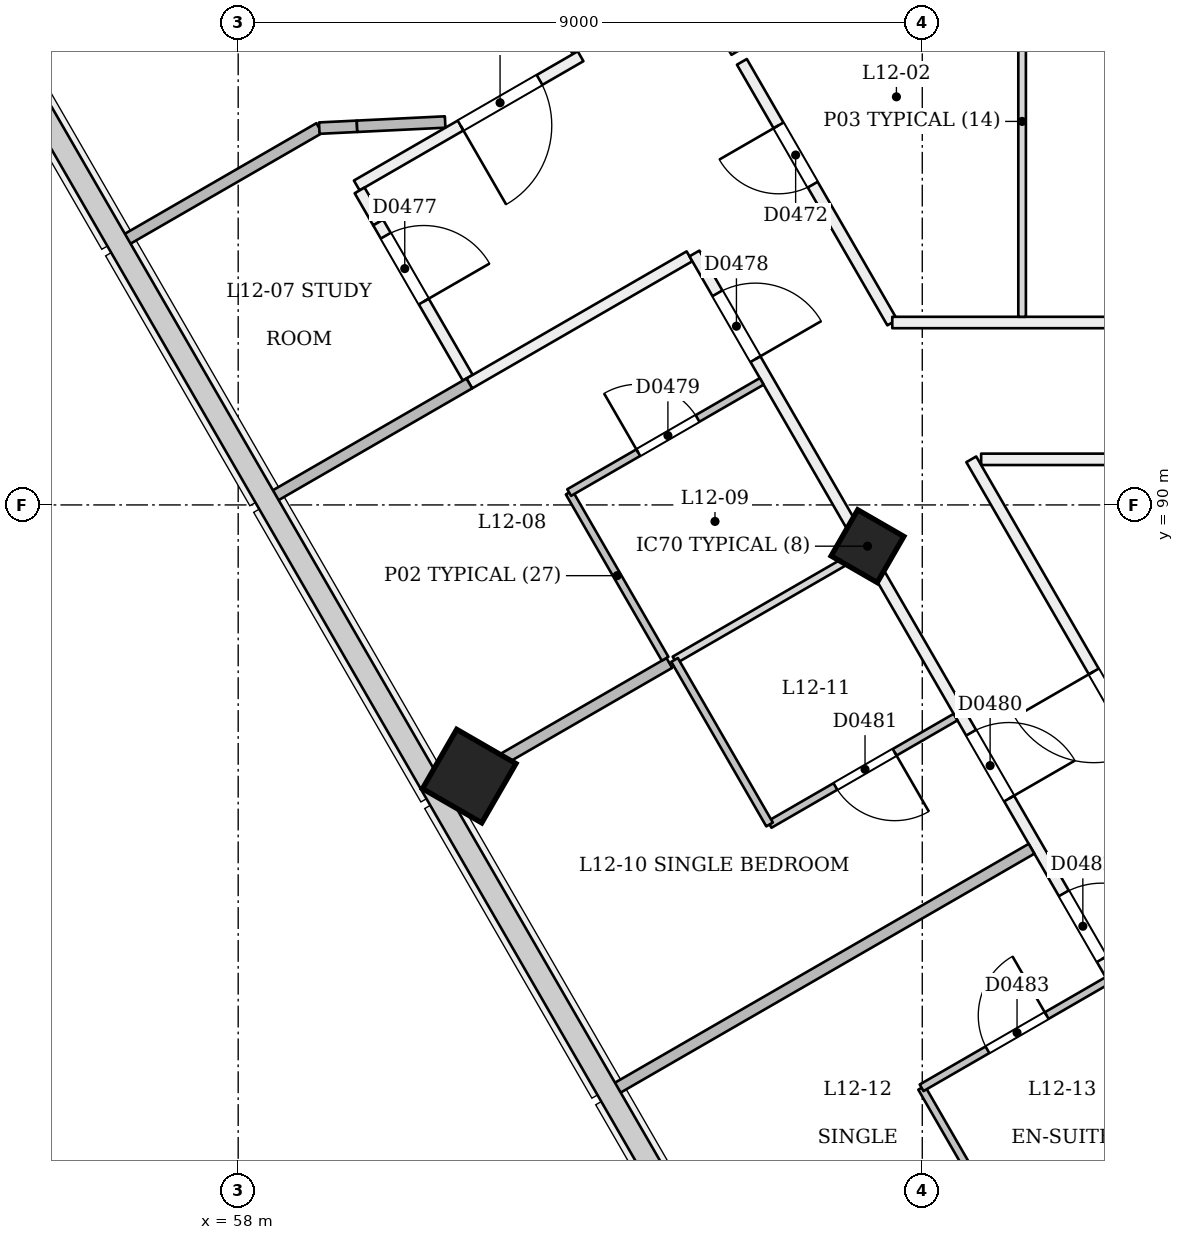
"""IFC4 building model, lengths in metres.
Left out: names, types, materials, properties, quantities, classifications, styles, units other than length and angle.
Written with IfcOpenShell. Run it as: python <this file> out.ifc"""

import sys

from ifc_helpers import new_model, si_unit, direction, frame, frame_2d, origin, origin_2d, place, context, subcontext, project, spatial, rectangle, extrude, element, fill, save


model = new_model("IFC4")
c1 = context("Model", 3, precision=1e-05, world=origin(), true_north=direction((0.0, 1.0)))
c2 = subcontext(c1, "Body", "Model", "MODEL_VIEW")
j1 = project(units=[si_unit("LENGTHUNIT", "METRE"), si_unit("PLANEANGLEUNIT", "RADIAN")], contexts=[c1])
p1 = place(None, origin())
s1 = spatial("IfcSite", under=j1, at=p1, CompositionType="ELEMENT")
p2 = place(p1, origin())
s2 = spatial("IfcBuilding", under=s1, at=p2, CompositionType="ELEMENT")
p3 = place(p2, frame((0.0, 0.0, 52.2)))
s3 = spatial("IfcBuildingStorey", under=s2, at=p3, CompositionType="ELEMENT", Elevation=52.2)
p4 = place(p3, frame((66.252, 89.41, -0.021), z_axis=(0.02215369191, 0.038413282303, 0.999016333038), x_axis=(-0.865357758702, -0.499681054678, 0.038403034389)))
e1 = element("IfcColumn", 1, at=p4, inside=s3, PredefinedType="COLUMN", context=c2, shape_type="SweptSolid", body=[
    extrude(rectangle(XDim=0.7, YDim=0.7, at=origin_2d()), origin(), (0.0, 0.0, 1.0), 3.604),
])
p5 = place(p3, frame((61.012, 86.385, -0.027), z_axis=(0.02222134892, 0.038480872521, 0.999012229206), x_axis=(-0.865637891076, -0.499189450988, 0.038482899528)))
e2 = element("IfcColumn", 2, at=p5, inside=s3, PredefinedType="COLUMN", context=c2, shape_type="SweptSolid", body=[
    extrude(rectangle(XDim=0.9, YDim=0.9, at=origin_2d()), origin(), (0.0, 0.0, 1.0), 3.604),
])
p6 = place(p3, frame((64.554, 95.959, 0.0), z_axis=(0.0, 0.0, 1.0), x_axis=(-0.502910495829, 0.864338494564, 0.0)))
e3 = element("IfcWall", 3, at=p6, inside=s3, PredefinedType="PARTITIONING", context=c2, shape_type="SweptSolid", body=[
    extrude(rectangle(XDim=0.98, YDim=0.15, at=frame_2d((0.49, 0.0))), origin(), (0.0, 0.0, 1.0), 3.1),
])
p7 = place(p3, frame((66.605, 92.4, 0.0), z_axis=(0.0, 0.0, 1.0), x_axis=(-0.499793629879, 0.866144518849, 0.0)))
e4 = element("IfcWall", 4, at=p7, inside=s3, PredefinedType="PARTITIONING", context=c2, shape_type="SweptSolid", body=[
    extrude(rectangle(XDim=3.959, YDim=0.15, at=frame_2d((1.979, 0.0))), origin(), (0.0, 0.0, 1.0), 3.1),
])
p8 = place(p7, frame((2.094, 0.0, 0.0)))
e5 = element("IfcOpeningElement", 5, at=p8, cuts=e4, PredefinedType="OPENING", context=c2, shape_type="SweptSolid", body=[
    extrude(rectangle(XDim=0.9, YDim=2.1, at=frame_2d((0.45, 1.05))), frame((0.0, 0.085, 0.0), z_axis=(0.0, -1.0, 0.0), x_axis=(1.0, 0.0, 0.0)), (0.0, 0.0, 1.0), 0.171),
])
p9 = place(p3, frame((70.125, 92.4, 0.0), z_axis=(0.0, 0.0, 1.0), x_axis=(-1.0, 0.0, 0.0)))
e6 = element("IfcWall", 6, at=p9, inside=s3, PredefinedType="PARTITIONING", context=c2, shape_type="SweptSolid", body=[
    extrude(rectangle(XDim=3.52, YDim=0.15, at=frame_2d((1.76, 0.0))), origin(), (0.0, 0.0, 1.0), 3.1),
])
p10 = place(p3, frame((61.983, 96.806, 0.0), z_axis=(0.0, 0.0, 1.0), x_axis=(0.499962526042, -0.866047038303, 0.0)))
e7 = element("IfcWall", 7, at=p10, inside=s3, PredefinedType="PARTITIONING", context=c2, shape_type="SweptSolid", body=[
    extrude(rectangle(XDim=0.968, YDim=0.15, at=frame_2d((0.484, 0.0))), origin(), (0.0, 0.0, 1.0), 3.1),
])
p11 = place(p3, frame((62.505, 95.903, 0.0), z_axis=(0.0, 0.0, 1.0), x_axis=(-0.866038511948, -0.499977295307, 0.0)))
e8 = element("IfcWall", 8, at=p11, inside=s3, PredefinedType="PARTITIONING", context=c2, shape_type="SweptSolid", body=[
    extrude(rectangle(XDim=3.4, YDim=0.15, at=frame_2d((1.7, 0.0))), origin(), (0.0, 0.0, 1.0), 2.6),
])
p12 = place(p11, frame((0.623, 0.0, 0.0)))
e9 = element("IfcOpeningElement", 9, at=p12, cuts=e8, PredefinedType="OPENING", context=c2, shape_type="SweptSolid", body=[
    extrude(rectangle(XDim=1.2, YDim=2.1, at=frame_2d((0.6, 1.05))), frame((0.0, 0.085, 0.0), z_axis=(0.0, -1.0, 0.0), x_axis=(1.0, 0.0, 0.0)), (0.0, 0.0, 1.0), 0.171),
])
p13 = place(p3, frame((59.598, 94.138, 0.0), z_axis=(0.0, 0.0, 1.0), x_axis=(0.499852395195, -0.866110606688, 0.0)))
e10 = element("IfcWall", 10, at=p13, inside=s3, PredefinedType="PARTITIONING", context=c2, shape_type="SweptSolid", body=[
    extrude(rectangle(XDim=0.488, YDim=0.15, at=frame_2d((0.244, 0.0))), origin(), (0.0, 0.0, 1.0), 2.6),
])
p14 = place(p3, frame((59.842, 93.715, 0.0), z_axis=(0.0, 0.0, 1.0), x_axis=(0.500003288626, -0.866023505087, 0.0)))
e11 = element("IfcWall", 11, at=p14, inside=s3, PredefinedType="PARTITIONING", context=c2, shape_type="SweptSolid", body=[
    extrude(rectangle(XDim=2.358, YDim=0.15, at=frame_2d((1.179, 0.0))), origin(), (0.0, 0.0, 1.0), 3.1),
])
p15 = place(p14, frame((0.2, 0.0, 0.0)))
e12 = element("IfcOpeningElement", 12, at=p15, cuts=e11, PredefinedType="OPENING", context=c2, shape_type="SweptSolid", body=[
    extrude(rectangle(XDim=1.0, YDim=2.1, at=frame_2d((0.5, 1.05))), frame((0.0, 0.085, 0.0), z_axis=(0.0, -1.0, 0.0), x_axis=(1.0, 0.0, 0.0)), (0.0, 0.0, 1.0), 0.171),
])
p16 = place(p3, frame((61.041, 91.598, 0.0), z_axis=(0.0, 0.0, 1.0), x_axis=(0.866033651025, 0.499985715088, 0.0)))
e13 = element("IfcWall", 13, at=p16, inside=s3, PredefinedType="PARTITIONING", context=c2, shape_type="SweptSolid", body=[
    extrude(rectangle(XDim=3.345, YDim=0.15, at=frame_2d((1.672, 0.0))), origin(), (0.0, 0.0, 1.0), 3.1),
])
p17 = place(p3, frame((64.002, 93.308, 0.0), z_axis=(0.0, 0.0, 1.0), x_axis=(0.49999948646, -0.866025700277, 0.0)))
e14 = element("IfcWall", 14, at=p17, inside=s3, PredefinedType="PARTITIONING", context=c2, shape_type="SweptSolid", body=[
    extrude(rectangle(XDim=38.6, YDim=0.15, at=frame_2d((19.3, 0.0))), origin(), (0.0, 0.0, 1.0), 2.7),
])
p18 = place(p17, frame((0.605, 0.0, 0.0)))
e15 = element("IfcOpeningElement", 15, at=p18, cuts=e14, PredefinedType="OPENING", context=c2, shape_type="SweptSolid", body=[
    extrude(rectangle(XDim=1.0, YDim=2.1, at=frame_2d((0.5, 1.05))), frame((0.0, 0.085, 0.0), z_axis=(0.0, -1.0, 0.0), x_axis=(1.0, 0.0, 0.0)), (0.0, 0.0, 1.0), 0.171),
])
p19 = place(p17, frame((7.28, 0.0, 0.0)))
e16 = element("IfcOpeningElement", 16, at=p19, cuts=e14, PredefinedType="OPENING", context=c2, shape_type="SweptSolid", body=[
    extrude(rectangle(XDim=1.0, YDim=2.1, at=frame_2d((0.5, 1.05))), frame((0.0, 0.085, 0.0), z_axis=(0.0, -1.0, 0.0), x_axis=(1.0, 0.0, 0.0)), (0.0, 0.0, 1.0), 0.171),
])
p20 = place(p17, frame((9.72, 0.0, 0.0)))
e17 = element("IfcOpeningElement", 17, at=p20, cuts=e14, PredefinedType="OPENING", context=c2, shape_type="SweptSolid", body=[
    extrude(rectangle(XDim=1.0, YDim=2.1, at=frame_2d((0.5, 1.05))), frame((0.0, 0.085, 0.0), z_axis=(0.0, -1.0, 0.0), x_axis=(1.0, 0.0, 0.0)), (0.0, 0.0, 1.0), 0.171),
])
p21 = place(p17, frame((16.395, 0.0, 0.0)))
e18 = element("IfcOpeningElement", 18, at=p21, cuts=e14, PredefinedType="OPENING", context=c2, shape_type="SweptSolid", body=[
    extrude(rectangle(XDim=1.0, YDim=2.1, at=frame_2d((0.5, 1.05))), frame((0.0, 0.085, 0.0), z_axis=(0.0, -1.0, 0.0), x_axis=(1.0, 0.0, 0.0)), (0.0, 0.0, 1.0), 0.171),
])
p22 = place(p17, frame((18.72, 0.0, 0.0)))
e19 = element("IfcOpeningElement", 19, at=p22, cuts=e14, PredefinedType="OPENING", context=c2, shape_type="SweptSolid", body=[
    extrude(rectangle(XDim=1.0, YDim=2.1, at=frame_2d((0.5, 1.05))), frame((0.0, 0.085, 0.0), z_axis=(0.0, -1.0, 0.0), x_axis=(1.0, 0.0, 0.0)), (0.0, 0.0, 1.0), 0.171),
])
p23 = place(p17, frame((25.395, 0.0, 0.0)))
e20 = element("IfcOpeningElement", 20, at=p23, cuts=e14, PredefinedType="OPENING", context=c2, shape_type="SweptSolid", body=[
    extrude(rectangle(XDim=1.0, YDim=2.1, at=frame_2d((0.5, 1.05))), frame((0.0, 0.085, 0.0), z_axis=(0.0, -1.0, 0.0), x_axis=(1.0, 0.0, 0.0)), (0.0, 0.0, 1.0), 0.171),
])
p24 = place(p17, frame((27.605, 0.0, 0.0)))
e21 = element("IfcOpeningElement", 21, at=p24, cuts=e14, PredefinedType="OPENING", context=c2, shape_type="SweptSolid", body=[
    extrude(rectangle(XDim=1.0, YDim=2.1, at=frame_2d((0.5, 1.05))), frame((0.0, 0.085, 0.0), z_axis=(0.0, -1.0, 0.0), x_axis=(1.0, 0.0, 0.0)), (0.0, 0.0, 1.0), 0.171),
])
p25 = place(p17, frame((34.28, 0.0, 0.0)))
e22 = element("IfcOpeningElement", 22, at=p25, cuts=e14, PredefinedType="OPENING", context=c2, shape_type="SweptSolid", body=[
    extrude(rectangle(XDim=1.0, YDim=2.1, at=frame_2d((0.5, 1.05))), frame((0.0, 0.085, 0.0), z_axis=(0.0, -1.0, 0.0), x_axis=(1.0, 0.0, 0.0)), (0.0, 0.0, 1.0), 0.171),
])
p26 = place(p17, frame((37.324, 0.0, 0.0)))
e23 = element("IfcOpeningElement", 23, at=p26, cuts=e14, PredefinedType="OPENING", context=c2, shape_type="SweptSolid", body=[
    extrude(rectangle(XDim=1.0, YDim=2.1, at=frame_2d((0.5, 1.05))), frame((0.0, 0.085, 0.0), z_axis=(0.0, -1.0, 0.0), x_axis=(1.0, 0.0, 0.0)), (0.0, 0.0, 1.0), 0.171),
])
p27 = place(p3, frame((85.0, 60.54, 0.0), z_axis=(0.0, 0.0, 1.0), x_axis=(-0.500000084694, 0.866025354886, 0.0)))
e24 = element("IfcWall", 24, at=p27, inside=s3, PredefinedType="PARTITIONING", context=c2, shape_type="SweptSolid", body=[
    extrude(rectangle(XDim=34.711, YDim=0.15, at=frame_2d((17.355, 0.0))), origin(), (0.0, 0.0, 1.0), 3.1),
])
p28 = place(p27, frame((5.966, 0.0, 0.0)))
e25 = element("IfcOpeningElement", 25, at=p28, cuts=e24, PredefinedType="OPENING", context=c2, shape_type="SweptSolid", body=[
    extrude(rectangle(XDim=1.2, YDim=2.1, at=frame_2d((0.6, 1.05))), frame((0.0, 0.085, 0.0), z_axis=(0.0, -1.0, 0.0), x_axis=(1.0, 0.0, 0.0)), (0.0, 0.0, 1.0), 0.171),
])
p29 = place(p27, frame((11.813, 0.0, 0.0)))
e26 = element("IfcOpeningElement", 26, at=p29, cuts=e24, PredefinedType="OPENING", context=c2, shape_type="SweptSolid", body=[
    extrude(rectangle(XDim=1.2, YDim=2.1, at=frame_2d((0.6, 1.05))), frame((0.0, 0.085, 0.0), z_axis=(0.0, -1.0, 0.0), x_axis=(1.0, 0.0, 0.0)), (0.0, 0.0, 1.0), 0.171),
])
p30 = place(p27, frame((25.156, 0.0, 0.0)))
e27 = element("IfcOpeningElement", 27, at=p30, cuts=e24, PredefinedType="OPENING", context=c2, shape_type="SweptSolid", body=[
    extrude(rectangle(XDim=1.2, YDim=2.1, at=frame_2d((0.6, 1.05))), frame((0.0, 0.085, 0.0), z_axis=(0.0, -1.0, 0.0), x_axis=(1.0, 0.0, 0.0)), (0.0, 0.0, 1.0), 0.171),
])
p31 = place(p27, frame((30.288, 0.0, 0.0)))
e28 = element("IfcOpeningElement", 28, at=p31, cuts=e24, PredefinedType="OPENING", context=c2, shape_type="SweptSolid", body=[
    extrude(rectangle(XDim=1.2, YDim=2.1, at=frame_2d((0.6, 1.05))), frame((0.0, 0.085, 0.0), z_axis=(0.0, -1.0, 0.0), x_axis=(1.0, 0.0, 0.0)), (0.0, 0.0, 1.0), 0.171),
])
p32 = place(p27, frame((15.887, 0.0, 0.0)))
e29 = element("IfcOpeningElement", 29, at=p32, cuts=e24, PredefinedType="OPENING", context=c2, shape_type="SweptSolid", body=[
    extrude(rectangle(XDim=1.2, YDim=2.1, at=frame_2d((0.6, 1.05))), frame((0.0, 0.085, 0.0), z_axis=(0.0, -1.0, 0.0), x_axis=(1.0, 0.0, 0.0)), (0.0, 0.0, 1.0), 0.171),
])
p33 = place(p27, frame((19.777, 0.0, 0.0)))
e30 = element("IfcOpeningElement", 30, at=p33, cuts=e24, PredefinedType="OPENING", context=c2, shape_type="SweptSolid", body=[
    extrude(rectangle(XDim=1.2, YDim=2.1, at=frame_2d((0.6, 1.05))), frame((0.0, 0.085, 0.0), z_axis=(0.0, -1.0, 0.0), x_axis=(1.0, 0.0, 0.0)), (0.0, 0.0, 1.0), 0.171),
])
p34 = place(p3, frame((67.775, 90.6, 0.0), z_axis=(0.0, 0.0, 1.0), x_axis=(0.999999997644, -6.8649493e-05, 0.0)))
e31 = element("IfcWall", 31, at=p34, inside=s3, PredefinedType="PARTITIONING", context=c2, shape_type="SweptSolid", body=[
    extrude(rectangle(XDim=14.225, YDim=0.15, at=frame_2d((7.113, 0.0))), origin(), (0.0, 0.0, 1.0), 3.1),
])
p35 = place(p3, frame((68.313, 92.475, 0.0), z_axis=(0.0, 0.0, 1.0), x_axis=(0.0, 1.0, 0.0)))
e32 = element("IfcWall", 32, at=p35, inside=s3, PredefinedType="PARTITIONING", context=c2, shape_type="SweptSolid", body=[
    extrude(rectangle(XDim=5.141, YDim=0.1, at=frame_2d((2.571, 0.0))), origin(), (0.0, 0.0, 1.0), 3.1),
])
p36 = place(p3, frame((56.494, 93.472, 0.0), z_axis=(0.0, 0.0, 1.0), x_axis=(0.866024066802, 0.500002315714, 0.0)))
e33 = element("IfcWall", 33, at=p36, inside=s3, PredefinedType="PARTITIONING", context=c2, shape_type="SweptSolid", body=[
    extrude(rectangle(XDim=2.97, YDim=0.15, at=frame_2d((1.485, 0.0))), origin(), (0.0, 0.0, 1.0), 2.6),
])
p37 = place(p3, frame((59.067, 94.957, 0.0), z_axis=(0.0, 0.0, 1.0), x_axis=(0.998818750818, 0.048591182472, 0.0)))
e34 = element("IfcWall", 34, at=p37, inside=s3, PredefinedType="PARTITIONING", context=c2, shape_type="SweptSolid", body=[
    extrude(rectangle(XDim=0.497, YDim=0.15, at=frame_2d((0.249, 0.0))), origin(), (0.0, 0.0, 1.0), 2.6),
])
p38 = place(p3, frame((59.563, 94.981, 0.0), z_axis=(0.0, 0.0, 1.0), x_axis=(0.998819081856, 0.048584377323, 0.0)))
e35 = element("IfcWall", 35, at=p38, inside=s3, PredefinedType="PARTITIONING", context=c2, shape_type="SweptSolid", body=[
    extrude(rectangle(XDim=1.161, YDim=0.15, at=frame_2d((0.581, 0.0))), origin(), (0.0, 0.0, 1.0), 3.1),
])
p39 = place(p3, frame((58.442, 90.098, 0.0), z_axis=(0.0, 0.0, 1.0), x_axis=(0.866016204555, 0.500015933195, 0.0)))
e36 = element("IfcWall", 36, at=p39, inside=s3, PredefinedType="PARTITIONING", context=c2, shape_type="SweptSolid", body=[
    extrude(rectangle(XDim=3.0, YDim=0.15, at=frame_2d((1.5, 0.0))), origin(), (0.0, 0.0, 1.0), 2.6),
])
p40 = place(p3, frame((63.617, 87.976, 0.0), z_axis=(0.0, 0.0, 1.0), x_axis=(-0.499976333282, 0.866039067339, 0.0)))
e37 = element("IfcWall", 37, at=p40, inside=s3, PredefinedType="PARTITIONING", context=c2, shape_type="SweptSolid", body=[
    extrude(rectangle(XDim=2.525, YDim=0.1, at=frame_2d((1.262, 0.0))), origin(), (0.0, 0.0, 1.0), 2.7),
])
p41 = place(p3, frame((62.354, 90.163, 0.0), z_axis=(0.0, 0.0, 1.0), x_axis=(0.866046596414, 0.499963291492, 0.0)))
e38 = element("IfcWall", 38, at=p41, inside=s3, PredefinedType="PARTITIONING", context=c2, shape_type="SweptSolid", body=[
    extrude(rectangle(XDim=2.925, YDim=0.1, at=frame_2d((1.462, 0.0))), origin(), (0.0, 0.0, 1.0), 3.1),
])
p42 = place(p41, frame((1.05, 0.0, 0.0)))
e39 = element("IfcOpeningElement", 39, at=p42, cuts=e38, PredefinedType="OPENING", context=c2, shape_type="SweptSolid", body=[
    extrude(rectangle(XDim=0.9, YDim=2.1, at=frame_2d((0.45, 1.05))), frame((0.0, 0.061, 0.0), z_axis=(0.0, -1.0, 0.0), x_axis=(1.0, 0.0, 0.0)), (0.0, 0.0, 1.0), 0.121),
])
p43 = place(p3, frame((60.71, 86.211, 0.0), z_axis=(0.0, 0.0, 1.0), x_axis=(0.866038183914, 0.499977863513, 0.0)))
e40 = element("IfcWall", 40, at=p43, inside=s3, PredefinedType="PARTITIONING", context=c2, shape_type="SweptSolid", body=[
    extrude(rectangle(XDim=3.42, YDim=0.15, at=frame_2d((1.71, 0.0))), origin(), (0.0, 0.0, 1.0), 2.6),
])
p44 = place(p3, frame((63.741, 87.961, 0.0), z_axis=(0.0, 0.0, 1.0), x_axis=(0.866011447264, 0.500024172624, 0.0)))
e41 = element("IfcWall", 41, at=p44, inside=s3, PredefinedType="PARTITIONING", context=c2, shape_type="SweptSolid", body=[
    extrude(rectangle(XDim=2.825, YDim=0.1, at=frame_2d((1.413, 0.0))), origin(), (0.0, 0.0, 1.0), 2.7),
])
p45 = place(p3, frame((67.438, 87.208, 0.0), z_axis=(0.0, 0.0, 1.0), x_axis=(-0.866048868473, -0.499959355765, 0.0)))
e42 = element("IfcWall", 42, at=p45, inside=s3, PredefinedType="PARTITIONING", context=c2, shape_type="SweptSolid", body=[
    extrude(rectangle(XDim=2.825, YDim=0.1, at=frame_2d((1.413, 0.0))), origin(), (0.0, 0.0, 1.0), 3.1),
])
p46 = place(p45, frame((0.925, 0.0, 0.0)))
e43 = element("IfcOpeningElement", 43, at=p46, cuts=e42, PredefinedType="OPENING", context=c2, shape_type="SweptSolid", body=[
    extrude(rectangle(XDim=0.9, YDim=2.1, at=frame_2d((0.45, 1.05))), frame((0.0, 0.061, 0.0), z_axis=(0.0, -1.0, 0.0), x_axis=(1.0, 0.0, 0.0)), (0.0, 0.0, 1.0), 0.121),
])
p47 = place(p3, frame((64.991, 85.796, 0.0), z_axis=(0.0, 0.0, 1.0), x_axis=(-0.500004234368, 0.866022959057, 0.0)))
e44 = element("IfcWall", 44, at=p47, inside=s3, PredefinedType="PARTITIONING", context=c2, shape_type="SweptSolid", body=[
    extrude(rectangle(XDim=2.5, YDim=0.1, at=frame_2d((1.25, 0.0))), origin(), (0.0, 0.0, 1.0), 2.7),
])
p48 = place(p3, frame((62.942, 82.304, 0.0), z_axis=(0.0, 0.0, 1.0), x_axis=(0.866025401434, 0.500000004071, 0.0)))
e45 = element("IfcWall", 45, at=p48, inside=s3, PredefinedType="PARTITIONING", context=c2, shape_type="SweptSolid", body=[
    extrude(rectangle(XDim=6.345, YDim=0.15, at=frame_2d((3.173, 0.0))), origin(), (0.0, 0.0, 1.0), 2.6),
])
p49 = place(p3, frame((68.241, 80.167, 0.0), z_axis=(0.0, 0.0, 1.0), x_axis=(-0.500004234368, 0.866022959057, 0.0)))
e46 = element("IfcWall", 46, at=p49, inside=s3, PredefinedType="PARTITIONING", context=c2, shape_type="SweptSolid", body=[
    extrude(rectangle(XDim=2.5, YDim=0.1, at=frame_2d((1.25, 0.0))), origin(), (0.0, 0.0, 1.0), 2.7),
])
p50 = place(p3, frame((66.991, 82.332, 0.0), z_axis=(0.0, 0.0, 1.0), x_axis=(0.866048868473, 0.499959355765, 0.0)))
e47 = element("IfcWall", 47, at=p50, inside=s3, PredefinedType="PARTITIONING", context=c2, shape_type="SweptSolid", body=[
    extrude(rectangle(XDim=2.825, YDim=0.1, at=frame_2d((1.413, 0.0))), origin(), (0.0, 0.0, 1.0), 3.1),
])
p51 = place(p50, frame((1.0, 0.0, 0.0)))
e48 = element("IfcOpeningElement", 48, at=p51, cuts=e47, PredefinedType="OPENING", context=c2, shape_type="SweptSolid", body=[
    extrude(rectangle(XDim=0.9, YDim=2.1, at=frame_2d((0.45, 1.05))), frame((0.0, 0.061, 0.0), z_axis=(0.0, -1.0, 0.0), x_axis=(1.0, 0.0, 0.0)), (0.0, 0.0, 1.0), 0.121),
])
p52 = place(p3, frame((68.224, 80.157, 0.0), z_axis=(0.0, 0.0, 1.0), x_axis=(0.866026948466, 0.499997324523, 0.0)))
e49 = element("IfcWall", 49, at=p52, inside=s3, PredefinedType="PARTITIONING", context=c2, shape_type="SweptSolid", body=[
    extrude(rectangle(XDim=2.845, YDim=0.1, at=frame_2d((1.422, 0.0))), origin(), (0.0, 0.0, 1.0), 2.7),
])
p53 = place(p8, origin())
e50 = element("IfcDoor", 50, at=p53, inside=s3, OperationType="SINGLE_SWING_RIGHT", PredefinedType="NOTDEFINED", context=c2, shape_type="SweptSolid", body=[
    extrude(rectangle(XDim=0.9, YDim=2.1, at=frame_2d((0.45, 1.05))), frame((0.0, 0.025, 0.0), z_axis=(0.0, -1.0, 0.0), x_axis=(1.0, 0.0, 0.0)), (0.0, 0.0, 1.0), 0.05),
])
fill(e5, e50)
p54 = place(p12, origin())
e51 = element("IfcDoor", 51, at=p54, inside=s3, OperationType="SINGLE_SWING_RIGHT", PredefinedType="NOTDEFINED", context=c2, shape_type="SweptSolid", body=[
    extrude(rectangle(XDim=1.2, YDim=2.1, at=frame_2d((0.6, 1.05))), frame((0.0, 0.025, 0.0), z_axis=(0.0, -1.0, 0.0), x_axis=(1.0, 0.0, 0.0)), (0.0, 0.0, 1.0), 0.05),
])
fill(e9, e51)
p55 = place(p15, origin())
e52 = element("IfcDoor", 52, at=p55, inside=s3, OperationType="SINGLE_SWING_RIGHT", PredefinedType="NOTDEFINED", context=c2, shape_type="SweptSolid", body=[
    extrude(rectangle(XDim=1.0, YDim=2.1, at=frame_2d((0.5, 1.05))), frame((0.0, 0.025, 0.0), z_axis=(0.0, -1.0, 0.0), x_axis=(1.0, 0.0, 0.0)), (0.0, 0.0, 1.0), 0.05),
])
fill(e12, e52)
p56 = place(p18, origin())
e53 = element("IfcDoor", 53, at=p56, inside=s3, OperationType="SINGLE_SWING_RIGHT", PredefinedType="NOTDEFINED", context=c2, shape_type="SweptSolid", body=[
    extrude(rectangle(XDim=1.0, YDim=2.1, at=frame_2d((0.5, 1.05))), frame((0.0, 0.025, 0.0), z_axis=(0.0, -1.0, 0.0), x_axis=(1.0, 0.0, 0.0)), (0.0, 0.0, 1.0), 0.05),
])
fill(e15, e53)
p57 = place(p42, origin())
e54 = element("IfcDoor", 54, at=p57, inside=s3, OperationType="SINGLE_SWING_LEFT", PredefinedType="NOTDEFINED", context=c2, shape_type="SweptSolid", body=[
    extrude(rectangle(XDim=0.9, YDim=2.1, at=frame_2d((0.45, 1.05))), frame((0.0, 0.025, 0.0), z_axis=(0.0, -1.0, 0.0), x_axis=(1.0, 0.0, 0.0)), (0.0, 0.0, 1.0), 0.05),
])
fill(e39, e54)
p58 = place(p19, origin())
e55 = element("IfcDoor", 55, at=p58, inside=s3, OperationType="SINGLE_SWING_RIGHT", PredefinedType="NOTDEFINED", context=c2, shape_type="SweptSolid", body=[
    extrude(rectangle(XDim=1.0, YDim=2.1, at=frame_2d((0.5, 1.05))), frame((0.0, 0.025, 0.0), z_axis=(0.0, -1.0, 0.0), x_axis=(1.0, 0.0, 0.0)), (0.0, 0.0, 1.0), 0.05),
])
fill(e16, e55)
p59 = place(p46, origin())
e56 = element("IfcDoor", 56, at=p59, inside=s3, OperationType="SINGLE_SWING_LEFT", PredefinedType="NOTDEFINED", context=c2, shape_type="SweptSolid", body=[
    extrude(rectangle(XDim=0.9, YDim=2.1, at=frame_2d((0.45, 1.05))), frame((0.0, 0.025, 0.0), z_axis=(0.0, -1.0, 0.0), x_axis=(1.0, 0.0, 0.0)), (0.0, 0.0, 1.0), 0.05),
])
fill(e43, e56)
p60 = place(p20, origin())
e57 = element("IfcDoor", 57, at=p60, inside=s3, OperationType="SINGLE_SWING_RIGHT", PredefinedType="NOTDEFINED", context=c2, shape_type="SweptSolid", body=[
    extrude(rectangle(XDim=1.0, YDim=2.1, at=frame_2d((0.5, 1.05))), frame((0.0, 0.025, 0.0), z_axis=(0.0, -1.0, 0.0), x_axis=(1.0, 0.0, 0.0)), (0.0, 0.0, 1.0), 0.05),
])
fill(e17, e57)
p61 = place(p51, origin())
e58 = element("IfcDoor", 58, at=p61, inside=s3, OperationType="SINGLE_SWING_RIGHT", PredefinedType="NOTDEFINED", context=c2, shape_type="SweptSolid", body=[
    extrude(rectangle(XDim=0.9, YDim=2.1, at=frame_2d((0.45, 1.05))), frame((0.0, 0.025, 0.0), z_axis=(0.0, -1.0, 0.0), x_axis=(1.0, 0.0, 0.0)), (0.0, 0.0, 1.0), 0.05),
])
fill(e48, e58)
p62 = place(p31, origin())
e59 = element("IfcDoor", 59, at=p62, inside=s3, OperationType="SINGLE_SWING_RIGHT", PredefinedType="NOTDEFINED", context=c2, shape_type="SweptSolid", body=[
    extrude(rectangle(XDim=1.2, YDim=2.1, at=frame_2d((0.6, 1.05))), frame((0.0, 0.025, 0.0), z_axis=(0.0, -1.0, 0.0), x_axis=(1.0, 0.0, 0.0)), (0.0, 0.0, 1.0), 0.05),
])
fill(e28, e59)
save(model, sys.argv[1])
